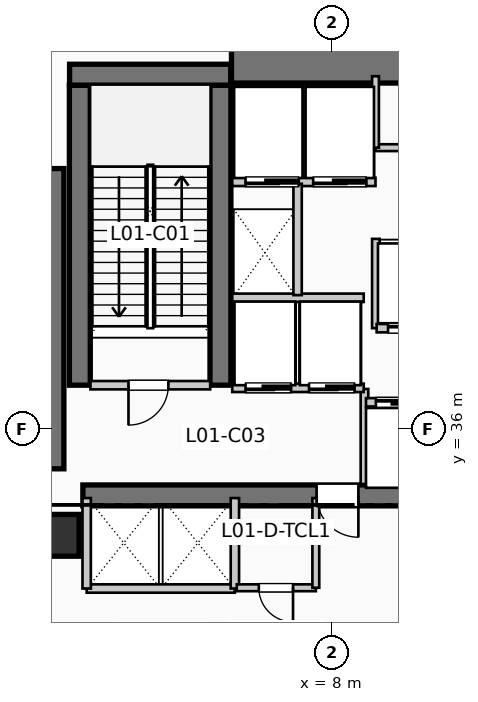
"""IFC4 building model, lengths in metres.
Left out: names, types, materials, properties, quantities, classifications, styles, units other than length and angle.
Written with IfcOpenShell. Run it as: python <this file> out.ifc"""

import sys

from ifc_helpers import new_model, si_unit, direction, frame, frame_2d, origin, origin_2d, place, context, subcontext, project, spatial, rectangle, extrude, element, fill, save


model = new_model("IFC4")
c1 = context("Model", 3, precision=1e-05, world=origin(), true_north=direction((0.0, 1.0)))
c2 = subcontext(c1, "Body", "Model", "MODEL_VIEW")
j1 = project(units=[si_unit("LENGTHUNIT", "METRE"), si_unit("PLANEANGLEUNIT", "RADIAN")], contexts=[c1])
p1 = place(None, origin())
s1 = spatial("IfcSite", under=j1, at=p1, CompositionType="ELEMENT")
p2 = place(p1, origin())
s2 = spatial("IfcBuilding", under=s1, at=p2, CompositionType="ELEMENT")
p3 = place(p2, frame((0.0, 0.0, 5.94)))
s3 = spatial("IfcBuildingStorey", under=s2, at=p3, CompositionType="ELEMENT", Elevation=5.94)
p4 = place(p3, frame((5.36, 45.55, 0.0), z_axis=(0.0, 0.0, 1.0), x_axis=(1.0, 0.0, 0.0)))
e1 = element("IfcWall", 1, at=p4, inside=s3, PredefinedType="SHEAR", context=c2, shape_type="SweptSolid", body=[
    extrude(rectangle(XDim=13.98, YDim=0.9, at=frame_2d((6.99, 0.0))), origin(), (0.0, 0.0, 1.0), 5.28),
])
p5 = place(p3, frame((0.5, 34.95, 0.0), z_axis=(0.0, 0.0, 1.0), x_axis=(0.0, 1.0, 0.0)))
e2 = element("IfcWall", 2, at=p5, inside=s3, PredefinedType="SHEAR", context=c2, shape_type="SweptSolid", body=[
    extrude(rectangle(XDim=7.9, YDim=0.9, at=frame_2d((3.95, 0.0))), origin(), (0.0, 0.0, 1.0), 5.28),
])
p6 = place(p3, frame((1.45, 34.25, 0.0), z_axis=(0.0, 0.0, 1.0), x_axis=(1.0, 0.0, 0.0)))
e3 = element("IfcWall", 3, at=p6, inside=s3, PredefinedType="SHEAR", context=c2, shape_type="SweptSolid", body=[
    extrude(rectangle(XDim=10.71, YDim=0.55, at=frame_2d((5.355, 0.0))), origin(), (0.0, 0.0, 1.0), 5.28),
])
p7 = place(p6, frame((7.25, 0.0, 0.0), z_axis=(0.0, 0.0, 1.0), x_axis=(-1.0, 0.0, 0.0)))
e4 = element("IfcOpeningElement", 4, at=p7, cuts=e3, PredefinedType="OPENING", context=c2, shape_type="SweptSolid", body=[
    extrude(rectangle(XDim=1.1, YDim=2.15, at=frame_2d((0.55, 1.075))), frame((0.0, 0.285, 0.0), z_axis=(0.0, -1.0, 0.0), x_axis=(1.0, 0.0, 0.0)), (0.0, 0.0, 1.0), 0.57),
])
for number, where, z_axis, x_axis in (
    (5, (1.37, 37.15, 0.0), (0.0, 0.0, 1.0), (0.0, 1.0, 0.0)),
    (6, (5.07, 37.15, 0.0), (0.0, 0.0, 1.0), (0.0, 1.0, 0.0)),
):
    element("IfcWall", number, at=place(p3, frame(where, z_axis=z_axis, x_axis=x_axis)), inside=s3, PredefinedType="SHEAR", context=c2, shape_type="SweptSolid", body=[
        extrude(rectangle(XDim=7.89, YDim=0.55, at=frame_2d((3.945, 0.0))), origin(), (0.0, 0.0, 1.0), 5.28),
    ])
p8 = place(p3, frame((1.1, 45.32, 0.0), z_axis=(0.0, 0.0, 1.0), x_axis=(1.0, 0.0, 0.0)))
e7 = element("IfcWall", 7, at=p8, inside=s3, PredefinedType="SHEAR", context=c2, shape_type="SweptSolid", body=[
    extrude(rectangle(XDim=4.24, YDim=0.55, at=frame_2d((2.12, 0.0))), origin(), (0.0, 0.0, 1.0), 5.28),
])
p9 = place(p3, frame((0.8, 33.2, 0.0), z_axis=(0.0, 0.0, 1.0), x_axis=(1.0, 0.0, 0.0)))
e8 = element("IfcColumn", 8, at=p9, inside=s3, PredefinedType="COLUMN", context=c2, shape_type="SweptSolid", body=[
    extrude(rectangle(XDim=1.1, YDim=1.1, at=origin_2d()), origin(), (0.0, 0.0, 1.0), 5.28),
])
p10 = place(p3, frame((1.088, 47.834, 0.0), z_axis=(0.0, 0.0, 1.0), x_axis=(-0.707106781187, -0.707106781187, 0.0)))
e9 = element("IfcWall", 9, at=p10, inside=s3, PredefinedType="SOLIDWALL", context=c2, shape_type="SweptSolid", body=[
    extrude(rectangle(XDim=4.133, YDim=0.36, at=frame_2d((2.066, 0.0))), origin(), (0.0, 0.0, 1.0), 4.96),
])
p11 = place(p3, frame((1.65, 37.15, 0.0), z_axis=(0.0, 0.0, 1.0), x_axis=(1.0, 0.0, 0.0)))
e10 = element("IfcWall", 10, at=p11, inside=s3, PredefinedType="PARTITIONING", context=c2, shape_type="SweptSolid", body=[
    extrude(rectangle(XDim=3.15, YDim=0.22, at=frame_2d((1.575, 0.0))), origin(), (0.0, 0.0, 1.0), 4.96),
])
p12 = place(p11, frame((2.05, 0.0, 0.0), z_axis=(0.0, 0.0, 1.0), x_axis=(-1.0, 0.0, 0.0)))
e11 = element("IfcOpeningElement", 11, at=p12, cuts=e10, PredefinedType="OPENING", context=c2, shape_type="SweptSolid", body=[
    extrude(rectangle(XDim=1.05, YDim=2.15, at=frame_2d((0.525, 1.075))), frame((0.0, 0.12, 0.0), z_axis=(0.0, -1.0, 0.0), x_axis=(1.0, 0.0, 0.0)), (0.0, 0.0, 1.0), 0.24),
])
p13 = place(p3, frame((8.86, 34.55, 0.0), z_axis=(0.0, 0.0, 1.0), x_axis=(0.0, 1.0, 0.0)))
e12 = element("IfcWall", 12, at=p13, inside=s3, PredefinedType="PARTITIONING", context=c2, shape_type="SweptSolid", body=[
    extrude(rectangle(XDim=2.5, YDim=0.2, at=frame_2d((1.25, 0.0))), origin(), (0.0, 0.0, 1.0), 4.96),
])
p14 = place(p3, frame((5.38, 37.08, 0.0), z_axis=(0.0, 0.0, 1.0), x_axis=(1.0, 0.0, 0.0)))
e13 = element("IfcWall", 13, at=p14, inside=s3, PredefinedType="PARTITIONING", context=c2, shape_type="SweptSolid", body=[
    extrude(rectangle(XDim=3.46, YDim=0.22, at=frame_2d((1.73, 0.0))), origin(), (0.0, 0.0, 1.0), 4.96),
])
p15 = place(p14, frame((1.55, 0.0, 0.0), z_axis=(0.0, 0.0, 1.0), x_axis=(-1.0, 0.0, 0.0)))
e14 = element("IfcOpeningElement", 14, at=p15, cuts=e13, PredefinedType="OPENING", context=c2, shape_type="SweptSolid", body=[
    extrude(rectangle(XDim=1.2, YDim=2.2, at=frame_2d((0.6, 1.1))), frame((0.0, 0.12, 0.0), z_axis=(0.0, -1.0, 0.0), x_axis=(1.0, 0.0, 0.0)), (0.0, 0.0, 1.0), 0.24),
])
p16 = place(p14, frame((3.22, 0.0, 0.0), z_axis=(0.0, 0.0, 1.0), x_axis=(-1.0, 0.0, 0.0)))
e15 = element("IfcOpeningElement", 15, at=p16, cuts=e13, PredefinedType="OPENING", context=c2, shape_type="SweptSolid", body=[
    extrude(rectangle(XDim=1.2, YDim=2.2, at=frame_2d((0.6, 1.1))), frame((0.0, 0.12, 0.0), z_axis=(0.0, -1.0, 0.0), x_axis=(1.0, 0.0, 0.0)), (0.0, 0.0, 1.0), 0.24),
])
p17 = place(p3, frame((5.38, 39.45, 0.0), z_axis=(0.0, 0.0, 1.0), x_axis=(1.0, 0.0, 0.0)))
e16 = element("IfcWall", 16, at=p17, inside=s3, PredefinedType="PARTITIONING", context=c2, shape_type="SweptSolid", body=[
    extrude(rectangle(XDim=3.46, YDim=0.22, at=frame_2d((1.73, 0.0))), origin(), (0.0, 0.0, 1.0), 4.96),
])
p18 = place(p3, frame((5.38, 42.5, 0.0), z_axis=(0.0, 0.0, 1.0), x_axis=(1.0, 0.0, 0.0)))
e17 = element("IfcWall", 17, at=p18, inside=s3, PredefinedType="PARTITIONING", context=c2, shape_type="SweptSolid", body=[
    extrude(rectangle(XDim=3.77, YDim=0.22, at=frame_2d((1.885, 0.0))), origin(), (0.0, 0.0, 1.0), 4.96),
])
p19 = place(p18, frame((1.75, 0.0, 0.0), z_axis=(0.0, 0.0, 1.0), x_axis=(-1.0, 0.0, 0.0)))
e18 = element("IfcOpeningElement", 18, at=p19, cuts=e17, PredefinedType="OPENING", context=c2, shape_type="SweptSolid", body=[
    extrude(rectangle(XDim=1.4, YDim=2.2, at=frame_2d((0.7, 1.1))), frame((0.0, 0.12, 0.0), z_axis=(0.0, -1.0, 0.0), x_axis=(1.0, 0.0, 0.0)), (0.0, 0.0, 1.0), 0.24),
])
p20 = place(p18, frame((3.53, 0.0, 0.0), z_axis=(0.0, 0.0, 1.0), x_axis=(-1.0, 0.0, 0.0)))
e19 = element("IfcOpeningElement", 19, at=p20, cuts=e17, PredefinedType="OPENING", context=c2, shape_type="SweptSolid", body=[
    extrude(rectangle(XDim=1.4, YDim=2.2, at=frame_2d((0.7, 1.1))), frame((0.0, 0.12, 0.0), z_axis=(0.0, -1.0, 0.0), x_axis=(1.0, 0.0, 0.0)), (0.0, 0.0, 1.0), 0.24),
])
p21 = place(p3, frame((7.1, 39.52, 0.0), z_axis=(0.0, 0.0, 1.0), x_axis=(0.0, 1.0, 0.0)))
e20 = element("IfcWall", 20, at=p21, inside=s3, PredefinedType="PARTITIONING", context=c2, shape_type="SweptSolid", body=[
    extrude(rectangle(XDim=2.93, YDim=0.22, at=frame_2d((1.465, 0.0))), origin(), (0.0, 0.0, 1.0), 4.96),
])
p22 = place(p3, frame((1.55, 31.8, 0.0), z_axis=(0.0, 0.0, 1.0), x_axis=(1.0, 0.0, 0.0)))
e21 = element("IfcWall", 21, at=p22, inside=s3, PredefinedType="PARTITIONING", context=c2, shape_type="SweptSolid", body=[
    extrude(rectangle(XDim=3.9, YDim=0.22, at=frame_2d((1.95, 0.0))), origin(), (0.0, 0.0, 1.0), 4.96),
])
for number, where, z_axis, x_axis in (
    (22, (1.55, 31.8, 0.0), (0.0, 0.0, 1.0), (0.0, 1.0, 0.0)),
    (23, (5.45, 31.8, 0.0), (0.0, 0.0, 1.0), (0.0, 1.0, 0.0)),
):
    element("IfcWall", number, at=place(p3, frame(where, z_axis=z_axis, x_axis=x_axis)), inside=s3, PredefinedType="PARTITIONING", context=c2, shape_type="SweptSolid", body=[
        extrude(rectangle(XDim=2.38, YDim=0.22, at=frame_2d((1.19, 0.0))), origin(), (0.0, 0.0, 1.0), 4.96),
    ])
p23 = place(p3, frame((9.16, 38.65, 0.0), z_axis=(0.0, 0.0, 1.0), x_axis=(0.0, 1.0, 0.0)))
e24 = element("IfcWall", 24, at=p23, inside=s3, PredefinedType="PARTITIONING", context=c2, shape_type="SweptSolid", body=[
    extrude(rectangle(XDim=2.35, YDim=0.2, at=frame_2d((1.175, 0.0))), origin(), (0.0, 0.0, 1.0), 4.96),
])
p24 = place(p3, frame((5.5, 31.82, 0.0), z_axis=(0.0, 0.0, 1.0), x_axis=(1.0, 0.0, 0.0)))
e25 = element("IfcWall", 25, at=p24, inside=s3, PredefinedType="PLUMBINGWALL", context=c2, shape_type="SweptSolid", body=[
    extrude(rectangle(XDim=2.08, YDim=0.18, at=frame_2d((1.04, 0.0))), origin(), (0.0, 0.0, 1.0), 4.96),
])
p25 = place(p24, frame((1.48, 0.0, 0.0), z_axis=(0.0, 0.0, 1.0), x_axis=(-1.0, 0.0, 0.0)))
e26 = element("IfcOpeningElement", 26, at=p25, cuts=e25, PredefinedType="OPENING", context=c2, shape_type="SweptSolid", body=[
    extrude(rectangle(XDim=0.9, YDim=2.1, at=frame_2d((0.45, 1.05))), frame((0.0, 0.1, 0.0), z_axis=(0.0, -1.0, 0.0), x_axis=(1.0, 0.0, 0.0)), (0.0, 0.0, 1.0), 0.2),
])
p26 = place(p3, frame((7.58, 31.82, 0.0), z_axis=(0.0, 0.0, 1.0), x_axis=(0.0, 1.0, 0.0)))
e27 = element("IfcWall", 27, at=p26, inside=s3, PredefinedType="PLUMBINGWALL", context=c2, shape_type="SweptSolid", body=[
    extrude(rectangle(XDim=2.36, YDim=0.18, at=frame_2d((1.18, 0.0))), origin(), (0.0, 0.0, 1.0), 4.96),
])
p27 = place(p3, frame((8.9, 36.7, 0.0), z_axis=(0.0, 0.0, 1.0), x_axis=(1.0, 0.0, 0.0)))
e28 = element("IfcWall", 28, at=p27, inside=s3, PredefinedType="PARTITIONING", context=c2, shape_type="SweptSolid", body=[
    extrude(rectangle(XDim=3.26, YDim=0.22, at=frame_2d((1.63, 0.0))), origin(), (0.0, 0.0, 1.0), 4.96),
])
p28 = place(p27, frame((0.26, 0.0, 0.0)))
e29 = element("IfcOpeningElement", 29, at=p28, cuts=e28, PredefinedType="OPENING", context=c2, shape_type="SweptSolid", body=[
    extrude(rectangle(XDim=1.1, YDim=2.2, at=frame_2d((0.55, 1.1))), frame((0.0, 0.12, 0.0), z_axis=(0.0, -1.0, 0.0), x_axis=(1.0, 0.0, 0.0)), (0.0, 0.0, 1.0), 0.24),
])
p29 = place(p27, frame((1.88, 0.0, 0.0)))
e30 = element("IfcOpeningElement", 30, at=p29, cuts=e28, PredefinedType="OPENING", context=c2, shape_type="SweptSolid", body=[
    extrude(rectangle(XDim=1.1, YDim=2.2, at=frame_2d((0.55, 1.1))), frame((0.0, 0.12, 0.0), z_axis=(0.0, -1.0, 0.0), x_axis=(1.0, 0.0, 0.0)), (0.0, 0.0, 1.0), 0.24),
])
p30 = place(p3, frame((9.18, 38.65, 0.0), z_axis=(0.0, 0.0, 1.0), x_axis=(1.0, 0.0, 0.0)))
e31 = element("IfcWall", 31, at=p30, inside=s3, PredefinedType="PARTITIONING", context=c2, shape_type="SweptSolid", body=[
    extrude(rectangle(XDim=3.38, YDim=0.22, at=frame_2d((1.69, 0.0))), origin(), (0.0, 0.0, 1.0), 4.96),
])
p31 = place(p30, frame((0.3, 0.0, 0.0)))
e32 = element("IfcOpeningElement", 32, at=p31, cuts=e31, PredefinedType="OPENING", context=c2, shape_type="SweptSolid", body=[
    extrude(rectangle(XDim=1.1, YDim=2.2, at=frame_2d((0.55, 1.1))), frame((0.0, 0.12, 0.0), z_axis=(0.0, -1.0, 0.0), x_axis=(1.0, 0.0, 0.0)), (0.0, 0.0, 1.0), 0.24),
])
p32 = place(p30, frame((1.95, 0.0, 0.0)))
e33 = element("IfcOpeningElement", 33, at=p32, cuts=e31, PredefinedType="OPENING", context=c2, shape_type="SweptSolid", body=[
    extrude(rectangle(XDim=1.1, YDim=2.2, at=frame_2d((0.55, 1.1))), frame((0.0, 0.12, 0.0), z_axis=(0.0, -1.0, 0.0), x_axis=(1.0, 0.0, 0.0)), (0.0, 0.0, 1.0), 0.24),
])
p33 = place(p3, frame((9.15, 43.4, 0.0), z_axis=(0.0, 0.0, 1.0), x_axis=(1.0, 0.0, 0.0)))
e34 = element("IfcWall", 34, at=p33, inside=s3, PredefinedType="PLUMBINGWALL", context=c2, shape_type="SweptSolid", body=[
    extrude(rectangle(XDim=9.33, YDim=0.18, at=frame_2d((4.665, 0.0))), origin(), (0.0, 0.0, 1.0), 4.96),
])
p34 = place(p33, frame((0.72, 0.0, 0.0)))
e35 = element("IfcOpeningElement", 35, at=p34, cuts=e34, PredefinedType="OPENING", context=c2, shape_type="SweptSolid", body=[
    extrude(rectangle(XDim=0.92, YDim=2.1, at=frame_2d((0.46, 1.05))), frame((0.0, 0.1, 0.0), z_axis=(0.0, -1.0, 0.0), x_axis=(1.0, 0.0, 0.0)), (0.0, 0.0, 1.0), 0.2),
])
p35 = place(p33, frame((3.02, 0.0, 0.0)))
e36 = element("IfcOpeningElement", 36, at=p35, cuts=e34, PredefinedType="OPENING", context=c2, shape_type="SweptSolid", body=[
    extrude(rectangle(XDim=0.92, YDim=2.1, at=frame_2d((0.46, 1.05))), frame((0.0, 0.1, 0.0), z_axis=(0.0, -1.0, 0.0), x_axis=(1.0, 0.0, 0.0)), (0.0, 0.0, 1.0), 0.2),
])
p36 = place(p33, frame((5.34, 0.0, 0.0)))
e37 = element("IfcOpeningElement", 37, at=p36, cuts=e34, PredefinedType="OPENING", context=c2, shape_type="SweptSolid", body=[
    extrude(rectangle(XDim=0.92, YDim=2.1, at=frame_2d((0.46, 1.05))), frame((0.0, 0.1, 0.0), z_axis=(0.0, -1.0, 0.0), x_axis=(1.0, 0.0, 0.0)), (0.0, 0.0, 1.0), 0.2),
])
p37 = place(p33, frame((7.66, 0.0, 0.0)))
e38 = element("IfcOpeningElement", 38, at=p37, cuts=e34, PredefinedType="OPENING", context=c2, shape_type="SweptSolid", body=[
    extrude(rectangle(XDim=0.95, YDim=2.1, at=frame_2d((0.475, 1.05))), frame((0.0, 0.1, 0.0), z_axis=(0.0, -1.0, 0.0), x_axis=(1.0, 0.0, 0.0)), (0.0, 0.0, 1.0), 0.2),
])
p38 = place(p3, frame((9.15, 43.4, 0.0), z_axis=(0.0, 0.0, 1.0), x_axis=(0.0, 1.0, 0.0)))
e39 = element("IfcWall", 39, at=p38, inside=s3, PredefinedType="PLUMBINGWALL", context=c2, shape_type="SweptSolid", body=[
    extrude(rectangle(XDim=1.88, YDim=0.18, at=frame_2d((0.94, 0.0))), origin(), (0.0, 0.0, 1.0), 4.96),
])
p39 = place(p12, origin())
e40 = element("IfcDoor", 40, at=p39, inside=s3, OperationType="SINGLE_SWING_LEFT", PredefinedType="DOOR", context=c2, shape_type="SweptSolid", body=[
    extrude(rectangle(XDim=1.05, YDim=2.15, at=frame_2d((0.525, 1.075))), frame((0.0, 0.025, 0.0), z_axis=(0.0, -1.0, 0.0), x_axis=(1.0, 0.0, 0.0)), (0.0, 0.0, 1.0), 0.05),
])
fill(e11, e40)
p40 = place(p7, origin())
e41 = element("IfcDoor", 41, at=p40, inside=s3, OperationType="SINGLE_SWING_RIGHT", PredefinedType="DOOR", context=c2, shape_type="SweptSolid", body=[
    extrude(rectangle(XDim=1.1, YDim=2.15, at=frame_2d((0.55, 1.075))), frame((0.0, 0.025, 0.0), z_axis=(0.0, -1.0, 0.0), x_axis=(1.0, 0.0, 0.0)), (0.0, 0.0, 1.0), 0.05),
])
fill(e4, e41)
p41 = place(p15, origin())
e42 = element("IfcDoor", 42, at=p41, inside=s3, OperationType="SLIDING_TO_RIGHT", PredefinedType="DOOR", context=c2, shape_type="SweptSolid", body=[
    extrude(rectangle(XDim=1.2, YDim=2.2, at=frame_2d((0.6, 1.1))), frame((0.0, 0.025, 0.0), z_axis=(0.0, -1.0, 0.0), x_axis=(1.0, 0.0, 0.0)), (0.0, 0.0, 1.0), 0.05),
])
fill(e14, e42)
p42 = place(p16, origin())
e43 = element("IfcDoor", 43, at=p42, inside=s3, OperationType="SLIDING_TO_RIGHT", PredefinedType="DOOR", context=c2, shape_type="SweptSolid", body=[
    extrude(rectangle(XDim=1.2, YDim=2.2, at=frame_2d((0.6, 1.1))), frame((0.0, 0.025, 0.0), z_axis=(0.0, -1.0, 0.0), x_axis=(1.0, 0.0, 0.0)), (0.0, 0.0, 1.0), 0.05),
])
fill(e15, e43)
p43 = place(p19, origin())
e44 = element("IfcDoor", 44, at=p43, inside=s3, OperationType="SLIDING_TO_LEFT", PredefinedType="DOOR", context=c2, shape_type="SweptSolid", body=[
    extrude(rectangle(XDim=1.4, YDim=2.2, at=frame_2d((0.7, 1.1))), frame((0.0, 0.025, 0.0), z_axis=(0.0, -1.0, 0.0), x_axis=(1.0, 0.0, 0.0)), (0.0, 0.0, 1.0), 0.05),
])
fill(e18, e44)
p44 = place(p20, origin())
e45 = element("IfcDoor", 45, at=p44, inside=s3, OperationType="SLIDING_TO_LEFT", PredefinedType="DOOR", context=c2, shape_type="SweptSolid", body=[
    extrude(rectangle(XDim=1.4, YDim=2.2, at=frame_2d((0.7, 1.1))), frame((0.0, 0.025, 0.0), z_axis=(0.0, -1.0, 0.0), x_axis=(1.0, 0.0, 0.0)), (0.0, 0.0, 1.0), 0.05),
])
fill(e19, e45)
p45 = place(p25, origin())
e46 = element("IfcDoor", 46, at=p45, inside=s3, OperationType="SINGLE_SWING_RIGHT", PredefinedType="DOOR", context=c2, shape_type="SweptSolid", body=[
    extrude(rectangle(XDim=0.9, YDim=2.1, at=frame_2d((0.45, 1.05))), frame((0.0, 0.025, 0.0), z_axis=(0.0, -1.0, 0.0), x_axis=(1.0, 0.0, 0.0)), (0.0, 0.0, 1.0), 0.05),
])
fill(e26, e46)
p46 = place(p28, origin())
e47 = element("IfcDoor", 47, at=p46, inside=s3, OperationType="SLIDING_TO_LEFT", PredefinedType="DOOR", context=c2, shape_type="SweptSolid", body=[
    extrude(rectangle(XDim=1.1, YDim=2.2, at=frame_2d((0.55, 1.1))), frame((0.0, 0.025, 0.0), z_axis=(0.0, -1.0, 0.0), x_axis=(1.0, 0.0, 0.0)), (0.0, 0.0, 1.0), 0.05),
])
fill(e29, e47)
p47 = place(p31, origin())
e48 = element("IfcDoor", 48, at=p47, inside=s3, OperationType="SLIDING_TO_LEFT", PredefinedType="DOOR", context=c2, shape_type="SweptSolid", body=[
    extrude(rectangle(XDim=1.1, YDim=2.2, at=frame_2d((0.55, 1.1))), frame((0.0, 0.025, 0.0), z_axis=(0.0, -1.0, 0.0), x_axis=(1.0, 0.0, 0.0)), (0.0, 0.0, 1.0), 0.05),
])
fill(e32, e48)
save(model, sys.argv[1])
